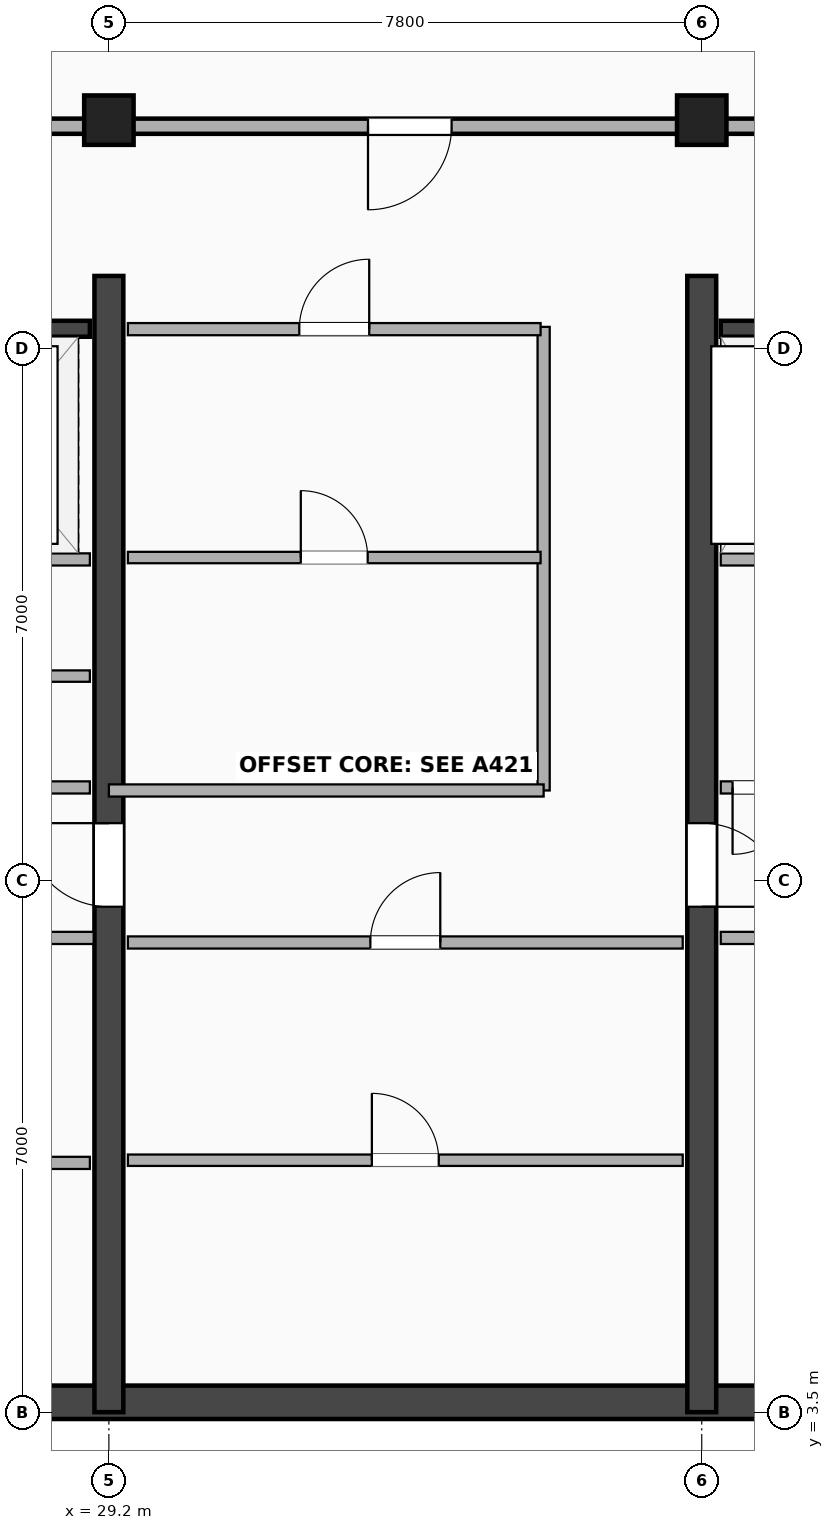
"""IFC4 building model, lengths in metres.
Left out: names, types, materials, properties, quantities, classifications, styles, units other than length and angle.
Written with IfcOpenShell. Run it as: python <this file> out.ifc"""

import sys

from ifc_helpers import new_model, si_unit, direction, frame, frame_2d, origin, origin_2d, place, context, subcontext, project, spatial, rectangle, extrude, element, fill, save


model = new_model("IFC4")
c1 = context("Model", 3, precision=1e-05, world=origin(), true_north=direction((0.0, 1.0)))
c2 = subcontext(c1, "Body", "Model", "MODEL_VIEW")
j1 = project(units=[si_unit("LENGTHUNIT", "METRE"), si_unit("PLANEANGLEUNIT", "RADIAN")], contexts=[c1])
p1 = place(None, origin())
s1 = spatial("IfcSite", under=j1, at=p1, CompositionType="ELEMENT")
p2 = place(p1, origin())
s2 = spatial("IfcBuilding", under=s1, at=p2, CompositionType="ELEMENT")
p3 = place(p2, frame((0.0, 0.0, 298.7)))
s3 = spatial("IfcBuildingStorey", under=s2, at=p3, CompositionType="ELEMENT", Elevation=298.7)
p4 = place(p3, frame((16.5, 3.63, 0.0), z_axis=(0.0, 0.0, 1.0), x_axis=(1.0, 0.0, 0.0)))
e1 = element("IfcWall", 1, at=p4, inside=s3, PredefinedType="SHEAR", context=c2, shape_type="SweptSolid", body=[
    extrude(rectangle(XDim=29.6, YDim=0.44, at=frame_2d((14.8, 0.0))), origin(), (0.0, 0.0, 1.0), 4.3),
])
p5 = place(p3, frame((29.2, 3.5, 0.0), z_axis=(0.0, 0.0, 1.0), x_axis=(0.0, 1.0, 0.0)))
e2 = element("IfcWall", 2, at=p5, inside=s3, PredefinedType="SHEAR", context=c2, shape_type="SweptSolid", body=[
    extrude(rectangle(XDim=14.95, YDim=0.38, at=frame_2d((7.475, 0.0))), origin(), (0.0, 0.0, 1.0), 4.3),
])
p6 = place(p5, frame((7.75, 0.0, 0.0), z_axis=(0.0, 0.0, 1.0), x_axis=(-1.0, 0.0, 0.0)))
e3 = element("IfcOpeningElement", 3, at=p6, cuts=e2, PredefinedType="OPENING", context=c2, shape_type="SweptSolid", body=[
    extrude(rectangle(XDim=1.1, YDim=2.15, at=frame_2d((0.55, 1.075))), frame((0.0, 0.2, 0.0), z_axis=(0.0, -1.0, 0.0), x_axis=(1.0, 0.0, 0.0)), (0.0, 0.0, 1.0), 0.4),
])
p7 = place(p3, frame((37.0, 3.5, 0.0), z_axis=(0.0, 0.0, 1.0), x_axis=(0.0, 1.0, 0.0)))
e4 = element("IfcWall", 4, at=p7, inside=s3, PredefinedType="SHEAR", context=c2, shape_type="SweptSolid", body=[
    extrude(rectangle(XDim=14.95, YDim=0.38, at=frame_2d((7.475, 0.0))), origin(), (0.0, 0.0, 1.0), 4.3),
])
p8 = place(p7, frame((6.65, 0.0, 0.0)))
e5 = element("IfcOpeningElement", 5, at=p8, cuts=e4, PredefinedType="OPENING", context=c2, shape_type="SweptSolid", body=[
    extrude(rectangle(XDim=1.1, YDim=2.15, at=frame_2d((0.55, 1.075))), frame((0.0, 0.2, 0.0), z_axis=(0.0, -1.0, 0.0), x_axis=(1.0, 0.0, 0.0)), (0.0, 0.0, 1.0), 0.4),
])
p9 = place(p3, frame((20.65, 17.755, 0.0), z_axis=(0.0, 0.0, 1.0), x_axis=(1.0, 0.0, 0.0)))
e6 = element("IfcWall", 6, at=p9, inside=s3, PredefinedType="SHEAR", context=c2, shape_type="SweptSolid", body=[
    extrude(rectangle(XDim=8.3, YDim=0.21, at=frame_2d((4.15, 0.0))), origin(), (0.0, 0.0, 1.0), 4.3),
])
p10 = place(p9, frame((2.2, 0.0, 0.0), z_axis=(0.0, 0.0, 1.0), x_axis=(-1.0, 0.0, 0.0)))
e7 = element("IfcOpeningElement", 7, at=p10, cuts=e6, PredefinedType="OPENING", context=c2, shape_type="SweptSolid", body=[
    extrude(rectangle(XDim=1.05, YDim=2.15, at=frame_2d((0.525, 1.075))), frame((0.0, 0.115, 0.0), z_axis=(0.0, -1.0, 0.0), x_axis=(1.0, 0.0, 0.0)), (0.0, 0.0, 1.0), 0.23),
])
p11 = place(p9, frame((4.15, 0.0, 0.0)))
e8 = element("IfcOpeningElement", 8, at=p11, cuts=e6, PredefinedType="OPENING", context=c2, shape_type="SweptSolid", body=[
    extrude(rectangle(XDim=1.1, YDim=2.18, at=frame_2d((0.55, 1.09))), frame((0.0, 0.115, 0.0), z_axis=(0.0, -1.0, 0.0), x_axis=(1.0, 0.0, 0.0)), (0.0, 0.0, 1.0), 0.23),
])
p12 = place(p3, frame((37.25, 17.755, 0.0), z_axis=(0.0, 0.0, 1.0), x_axis=(1.0, 0.0, 0.0)))
e9 = element("IfcWall", 9, at=p12, inside=s3, PredefinedType="SHEAR", context=c2, shape_type="SweptSolid", body=[
    extrude(rectangle(XDim=7.2, YDim=0.21, at=frame_2d((3.6, 0.0))), origin(), (0.0, 0.0, 1.0), 4.3),
])
p13 = place(p12, frame((2.05, 0.0, 0.0)))
e10 = element("IfcOpeningElement", 10, at=p13, cuts=e9, PredefinedType="OPENING", context=c2, shape_type="SweptSolid", body=[
    extrude(rectangle(XDim=1.1, YDim=2.18, at=frame_2d((0.55, 1.09))), frame((0.0, 0.115, 0.0), z_axis=(0.0, -1.0, 0.0), x_axis=(1.0, 0.0, 0.0)), (0.0, 0.0, 1.0), 0.23),
])
p14 = place(p12, frame((5.78, 0.0, 0.0), z_axis=(0.0, 0.0, 1.0), x_axis=(-1.0, 0.0, 0.0)))
e11 = element("IfcOpeningElement", 11, at=p14, cuts=e9, PredefinedType="OPENING", context=c2, shape_type="SweptSolid", body=[
    extrude(rectangle(XDim=1.05, YDim=2.15, at=frame_2d((0.525, 1.075))), frame((0.0, 0.115, 0.0), z_axis=(0.0, -1.0, 0.0), x_axis=(1.0, 0.0, 0.0)), (0.0, 0.0, 1.0), 0.23),
])
for number, where, z_axis, x_axis in (
    (12, (29.2, 20.5, -0.3), (0.0, 0.0, 1.0), (1.0, 0.0, 0.0)),
    (13, (37.0, 20.5, -0.3), (0.0, 0.0, 1.0), (1.0, 0.0, 0.0)),
):
    element("IfcColumn", number, at=place(p3, frame(where, z_axis=z_axis, x_axis=x_axis)), inside=s3, PredefinedType="COLUMN", context=c2, shape_type="SweptSolid", body=[
        extrude(rectangle(XDim=0.65, YDim=0.65, at=origin_2d()), origin(), (0.0, 0.0, 1.0), 4.6),
    ])
p15 = place(p3, frame((24.22, 14.72, 0.0), z_axis=(0.0, 0.0, 1.0), x_axis=(1.0, 0.0, 0.0)))
e14 = element("IfcWall", 14, at=p15, inside=s3, PredefinedType="PARTITIONING", context=c2, shape_type="SweptSolid", body=[
    extrude(rectangle(XDim=4.73, YDim=0.16, at=frame_2d((2.365, 0.0))), origin(), (0.0, 0.0, 1.0), 4.3),
])
p16 = place(p3, frame((37.25, 14.72, 0.0), z_axis=(0.0, 0.0, 1.0), x_axis=(1.0, 0.0, 0.0)))
e15 = element("IfcWall", 15, at=p16, inside=s3, PredefinedType="PARTITIONING", context=c2, shape_type="SweptSolid", body=[
    extrude(rectangle(XDim=3.61, YDim=0.16, at=frame_2d((1.805, 0.0))), origin(), (0.0, 0.0, 1.0), 4.3),
])
p17 = place(p3, frame((26.38, 20.42, 0.0), z_axis=(0.0, 0.0, 1.0), x_axis=(1.0, 0.0, 0.0)))
e16 = element("IfcWall", 16, at=p17, inside=s3, PredefinedType="PARTITIONING", context=c2, shape_type="SweptSolid", body=[
    extrude(rectangle(XDim=2.82, YDim=0.2, at=frame_2d((1.41, 0.0))), origin(), (0.0, 0.0, 1.0), 2.605),
])
p18 = place(p3, frame((29.2, 20.42, 0.0), z_axis=(0.0, 0.0, 1.0), x_axis=(1.0, 0.0, 0.0)))
e17 = element("IfcWall", 17, at=p18, inside=s3, PredefinedType="PARTITIONING", context=c2, shape_type="SweptSolid", body=[
    extrude(rectangle(XDim=7.8, YDim=0.2, at=frame_2d((3.9, 0.0))), origin(), (0.0, 0.0, 1.0), 2.605),
])
p19 = place(p18, frame((3.409, 0.0, 0.0)))
e18 = element("IfcOpeningElement", 18, at=p19, cuts=e17, PredefinedType="OPENING", context=c2, shape_type="SweptSolid", body=[
    extrude(rectangle(XDim=1.1, YDim=2.15, at=frame_2d((0.55, 1.075))), frame((0.0, 0.11, 0.0), z_axis=(0.0, -1.0, 0.0), x_axis=(1.0, 0.0, 0.0)), (0.0, 0.0, 1.0), 0.22),
])
p20 = place(p3, frame((37.0, 20.42, 0.0), z_axis=(0.0, 0.0, 1.0), x_axis=(1.0, 0.0, 0.0)))
e19 = element("IfcWall", 19, at=p20, inside=s3, PredefinedType="PARTITIONING", context=c2, shape_type="SweptSolid", body=[
    extrude(rectangle(XDim=7.45, YDim=0.2, at=frame_2d((3.725, 0.0))), origin(), (0.0, 0.0, 1.0), 2.605),
])
p21 = place(p20, frame((4.2, 0.0, 0.0)))
e20 = element("IfcOpeningElement", 20, at=p21, cuts=e19, PredefinedType="OPENING", context=c2, shape_type="SweptSolid", body=[
    extrude(rectangle(XDim=1.1, YDim=2.15, at=frame_2d((0.55, 1.075))), frame((0.0, 0.11, 0.0), z_axis=(0.0, -1.0, 0.0), x_axis=(1.0, 0.0, 0.0)), (0.0, 0.0, 1.0), 0.22),
])
p22 = place(p3, frame((24.22, 11.72, 0.0), z_axis=(0.0, 0.0, 1.0), x_axis=(1.0, 0.0, 0.0)))
e21 = element("IfcWall", 21, at=p22, inside=s3, PredefinedType="PARTITIONING", context=c2, shape_type="SweptSolid", body=[
    extrude(rectangle(XDim=4.73, YDim=0.16, at=frame_2d((2.365, 0.0))), origin(), (0.0, 0.0, 1.0), 4.3),
])
p23 = place(p22, frame((1.905, 0.0, 0.0)))
e22 = element("IfcOpeningElement", 22, at=p23, cuts=e21, PredefinedType="OPENING", context=c2, shape_type="SweptSolid", body=[
    extrude(rectangle(XDim=0.92, YDim=2.08, at=frame_2d((0.46, 1.04))), frame((0.0, 0.09, 0.0), z_axis=(0.0, -1.0, 0.0), x_axis=(1.0, 0.0, 0.0)), (0.0, 0.0, 1.0), 0.18),
])
p24 = place(p3, frame((24.22, 13.185, 0.0), z_axis=(0.0, 0.0, 1.0), x_axis=(1.0, 0.0, 0.0)))
e23 = element("IfcWall", 23, at=p24, inside=s3, PredefinedType="PARTITIONING", context=c2, shape_type="SweptSolid", body=[
    extrude(rectangle(XDim=4.73, YDim=0.15, at=frame_2d((2.365, 0.0))), origin(), (0.0, 0.0, 1.0), 4.3),
])
p25 = place(p24, frame((1.925, 0.0, 0.0)))
e24 = element("IfcOpeningElement", 24, at=p25, cuts=e23, PredefinedType="OPENING", context=c2, shape_type="SweptSolid", body=[
    extrude(rectangle(XDim=0.88, YDim=2.08, at=frame_2d((0.44, 1.04))), frame((0.0, 0.085, 0.0), z_axis=(0.0, -1.0, 0.0), x_axis=(1.0, 0.0, 0.0)), (0.0, 0.0, 1.0), 0.17),
])
p26 = place(p3, frame((37.25, 11.72, 0.0), z_axis=(0.0, 0.0, 1.0), x_axis=(1.0, 0.0, 0.0)))
e25 = element("IfcWall", 25, at=p26, inside=s3, PredefinedType="PARTITIONING", context=c2, shape_type="SweptSolid", body=[
    extrude(rectangle(XDim=1.191, YDim=0.16, at=frame_2d((0.596, 0.0))), origin(), (0.0, 0.0, 1.0), 4.3),
])
p27 = place(p26, frame((0.156, 0.0, 0.0)))
e26 = element("IfcOpeningElement", 26, at=p27, cuts=e25, PredefinedType="OPENING", context=c2, shape_type="SweptSolid", body=[
    extrude(rectangle(XDim=0.88, YDim=2.08, at=frame_2d((0.44, 1.04))), frame((0.0, 0.09, 0.0), z_axis=(0.0, -1.0, 0.0), x_axis=(1.0, 0.0, 0.0)), (0.0, 0.0, 1.0), 0.18),
])
p28 = place(p3, frame((20.65, 6.78, 0.0), z_axis=(0.0, 0.0, 1.0), x_axis=(1.0, 0.0, 0.0)))
e27 = element("IfcWall", 27, at=p28, inside=s3, PredefinedType="PARTITIONING", context=c2, shape_type="SweptSolid", body=[
    extrude(rectangle(XDim=8.3, YDim=0.16, at=frame_2d((4.15, 0.0))), origin(), (0.0, 0.0, 1.0), 4.3),
])
p29 = place(p3, frame((24.2, 9.74, 0.0), z_axis=(0.0, 0.0, 1.0), x_axis=(1.0, 0.0, 0.0)))
e28 = element("IfcWall", 28, at=p29, inside=s3, PredefinedType="PARTITIONING", context=c2, shape_type="SweptSolid", body=[
    extrude(rectangle(XDim=4.8, YDim=0.16, at=frame_2d((2.4, 0.0))), origin(), (0.0, 0.0, 1.0), 4.3),
])
p30 = place(p29, frame((1.85, 0.0, 0.0)))
e29 = element("IfcOpeningElement", 29, at=p30, cuts=e28, PredefinedType="OPENING", context=c2, shape_type="SweptSolid", body=[
    extrude(rectangle(XDim=1.1, YDim=2.15, at=frame_2d((0.55, 1.075))), frame((0.0, 0.09, 0.0), z_axis=(0.0, -1.0, 0.0), x_axis=(1.0, 0.0, 0.0)), (0.0, 0.0, 1.0), 0.18),
])
p31 = place(p3, frame((37.25, 9.74, 0.0), z_axis=(0.0, 0.0, 1.0), x_axis=(1.0, 0.0, 0.0)))
e30 = element("IfcWall", 30, at=p31, inside=s3, PredefinedType="PARTITIONING", context=c2, shape_type="SweptSolid", body=[
    extrude(rectangle(XDim=3.73, YDim=0.16, at=frame_2d((1.865, 0.0))), origin(), (0.0, 0.0, 1.0), 4.3),
])
p32 = place(p31, frame((2.25, 0.0, 0.0), z_axis=(0.0, 0.0, 1.0), x_axis=(-1.0, 0.0, 0.0)))
e31 = element("IfcOpeningElement", 31, at=p32, cuts=e30, PredefinedType="OPENING", context=c2, shape_type="SweptSolid", body=[
    extrude(rectangle(XDim=0.95, YDim=2.15, at=frame_2d((0.475, 1.075))), frame((0.0, 0.09, 0.0), z_axis=(0.0, -1.0, 0.0), x_axis=(1.0, 0.0, 0.0)), (0.0, 0.0, 1.0), 0.18),
])
p33 = place(p3, frame((34.92, 11.68, 0.0), z_axis=(0.0, 0.0, 1.0), x_axis=(0.0, 1.0, 0.0)))
e32 = element("IfcWall", 32, at=p33, inside=s3, PredefinedType="PARTITIONING", context=c2, shape_type="SweptSolid", body=[
    extrude(rectangle(XDim=6.1, YDim=0.16, at=frame_2d((3.05, 0.0))), origin(), (0.0, 0.0, 1.0), 4.3),
])
p34 = place(p3, frame((29.45, 9.68, 0.0), z_axis=(0.0, 0.0, 1.0), x_axis=(1.0, 0.0, 0.0)))
e33 = element("IfcWall", 33, at=p34, inside=s3, PredefinedType="PARTITIONING", context=c2, shape_type="SweptSolid", body=[
    extrude(rectangle(XDim=7.3, YDim=0.16, at=frame_2d((3.65, 0.0))), origin(), (0.0, 0.0, 1.0), 4.3),
])
p35 = place(p34, frame((4.11, 0.0, 0.0), z_axis=(0.0, 0.0, 1.0), x_axis=(-1.0, 0.0, 0.0)))
e34 = element("IfcOpeningElement", 34, at=p35, cuts=e33, PredefinedType="OPENING", context=c2, shape_type="SweptSolid", body=[
    extrude(rectangle(XDim=0.92, YDim=2.08, at=frame_2d((0.46, 1.04))), frame((0.0, 0.09, 0.0), z_axis=(0.0, -1.0, 0.0), x_axis=(1.0, 0.0, 0.0)), (0.0, 0.0, 1.0), 0.18),
])
p36 = place(p3, frame((29.45, 6.815, 0.0), z_axis=(0.0, 0.0, 1.0), x_axis=(1.0, 0.0, 0.0)))
e35 = element("IfcWall", 35, at=p36, inside=s3, PredefinedType="PARTITIONING", context=c2, shape_type="SweptSolid", body=[
    extrude(rectangle(XDim=7.3, YDim=0.15, at=frame_2d((3.65, 0.0))), origin(), (0.0, 0.0, 1.0), 4.3),
])
p37 = place(p36, frame((4.09, 0.0, 0.0), z_axis=(0.0, 0.0, 1.0), x_axis=(-1.0, 0.0, 0.0)))
e36 = element("IfcOpeningElement", 36, at=p37, cuts=e35, PredefinedType="OPENING", context=c2, shape_type="SweptSolid", body=[
    extrude(rectangle(XDim=0.88, YDim=2.08, at=frame_2d((0.44, 1.04))), frame((0.0, 0.085, 0.0), z_axis=(0.0, -1.0, 0.0), x_axis=(1.0, 0.0, 0.0)), (0.0, 0.0, 1.0), 0.17),
])
p38 = place(p3, frame((29.2, 11.68, 0.0), z_axis=(0.0, 0.0, 1.0), x_axis=(1.0, 0.0, 0.0)))
e37 = element("IfcWall", 37, at=p38, inside=s3, PredefinedType="PARTITIONING", context=c2, shape_type="SweptSolid", body=[
    extrude(rectangle(XDim=5.72, YDim=0.16, at=frame_2d((2.86, 0.0))), origin(), (0.0, 0.0, 1.0), 4.3),
])
p39 = place(p3, frame((29.45, 17.75, 0.0), z_axis=(0.0, 0.0, 1.0), x_axis=(1.0, 0.0, 0.0)))
e38 = element("IfcWall", 38, at=p39, inside=s3, PredefinedType="PARTITIONING", context=c2, shape_type="SweptSolid", body=[
    extrude(rectangle(XDim=5.43, YDim=0.16, at=frame_2d((2.715, 0.0))), origin(), (0.0, 0.0, 1.0), 4.3),
])
p40 = place(p39, frame((3.175, 0.0, 0.0), z_axis=(0.0, 0.0, 1.0), x_axis=(-1.0, 0.0, 0.0)))
e39 = element("IfcOpeningElement", 39, at=p40, cuts=e38, PredefinedType="OPENING", context=c2, shape_type="SweptSolid", body=[
    extrude(rectangle(XDim=0.92, YDim=2.08, at=frame_2d((0.46, 1.04))), frame((0.0, 0.09, 0.0), z_axis=(0.0, -1.0, 0.0), x_axis=(1.0, 0.0, 0.0)), (0.0, 0.0, 1.0), 0.18),
])
p41 = place(p3, frame((29.45, 14.745, 0.0), z_axis=(0.0, 0.0, 1.0), x_axis=(1.0, 0.0, 0.0)))
e40 = element("IfcWall", 40, at=p41, inside=s3, PredefinedType="PARTITIONING", context=c2, shape_type="SweptSolid", body=[
    extrude(rectangle(XDim=5.43, YDim=0.15, at=frame_2d((2.715, 0.0))), origin(), (0.0, 0.0, 1.0), 4.3),
])
p42 = place(p41, frame((3.155, 0.0, 0.0), z_axis=(0.0, 0.0, 1.0), x_axis=(-1.0, 0.0, 0.0)))
e41 = element("IfcOpeningElement", 41, at=p42, cuts=e40, PredefinedType="OPENING", context=c2, shape_type="SweptSolid", body=[
    extrude(rectangle(XDim=0.88, YDim=2.08, at=frame_2d((0.44, 1.04))), frame((0.0, 0.085, 0.0), z_axis=(0.0, -1.0, 0.0), x_axis=(1.0, 0.0, 0.0)), (0.0, 0.0, 1.0), 0.17),
])
p43 = place(p6, origin())
e42 = element("IfcDoor", 42, at=p43, inside=s3, OperationType="SINGLE_SWING_RIGHT", PredefinedType="DOOR", context=c2, shape_type="SweptSolid", body=[
    extrude(rectangle(XDim=1.1, YDim=2.15, at=frame_2d((0.55, 1.075))), frame((0.0, 0.025, 0.0), z_axis=(0.0, -1.0, 0.0), x_axis=(1.0, 0.0, 0.0)), (0.0, 0.0, 1.0), 0.05),
])
fill(e3, e42)
p44 = place(p8, origin())
e43 = element("IfcDoor", 43, at=p44, inside=s3, OperationType="SINGLE_SWING_LEFT", PredefinedType="DOOR", context=c2, shape_type="SweptSolid", body=[
    extrude(rectangle(XDim=1.1, YDim=2.15, at=frame_2d((0.55, 1.075))), frame((0.0, 0.025, 0.0), z_axis=(0.0, -1.0, 0.0), x_axis=(1.0, 0.0, 0.0)), (0.0, 0.0, 1.0), 0.05),
])
fill(e5, e43)
p45 = place(p19, origin())
e44 = element("IfcDoor", 44, at=p45, inside=s3, OperationType="SINGLE_SWING_LEFT", PredefinedType="DOOR", context=c2, shape_type="SweptSolid", body=[
    extrude(rectangle(XDim=1.1, YDim=2.15, at=frame_2d((0.55, 1.075))), frame((0.0, 0.025, 0.0), z_axis=(0.0, -1.0, 0.0), x_axis=(1.0, 0.0, 0.0)), (0.0, 0.0, 1.0), 0.05),
])
fill(e18, e44)
p46 = place(p27, origin())
e45 = element("IfcDoor", 45, at=p46, inside=s3, OperationType="SINGLE_SWING_LEFT", PredefinedType="DOOR", context=c2, shape_type="SweptSolid", body=[
    extrude(rectangle(XDim=0.88, YDim=2.08, at=frame_2d((0.44, 1.04))), frame((0.0, 0.025, 0.0), z_axis=(0.0, -1.0, 0.0), x_axis=(1.0, 0.0, 0.0)), (0.0, 0.0, 1.0), 0.05),
])
fill(e26, e45)
p47 = place(p35, origin())
e46 = element("IfcDoor", 46, at=p47, inside=s3, OperationType="SINGLE_SWING_RIGHT", PredefinedType="DOOR", context=c2, shape_type="SweptSolid", body=[
    extrude(rectangle(XDim=0.92, YDim=2.08, at=frame_2d((0.46, 1.04))), frame((0.0, 0.025, 0.0), z_axis=(0.0, -1.0, 0.0), x_axis=(1.0, 0.0, 0.0)), (0.0, 0.0, 1.0), 0.05),
])
fill(e34, e46)
p48 = place(p37, origin())
e47 = element("IfcDoor", 47, at=p48, inside=s3, OperationType="SINGLE_SWING_LEFT", PredefinedType="DOOR", context=c2, shape_type="SweptSolid", body=[
    extrude(rectangle(XDim=0.88, YDim=2.08, at=frame_2d((0.44, 1.04))), frame((0.0, 0.025, 0.0), z_axis=(0.0, -1.0, 0.0), x_axis=(1.0, 0.0, 0.0)), (0.0, 0.0, 1.0), 0.05),
])
fill(e36, e47)
p49 = place(p40, origin())
e48 = element("IfcDoor", 48, at=p49, inside=s3, OperationType="SINGLE_SWING_RIGHT", PredefinedType="DOOR", context=c2, shape_type="SweptSolid", body=[
    extrude(rectangle(XDim=0.92, YDim=2.08, at=frame_2d((0.46, 1.04))), frame((0.0, 0.025, 0.0), z_axis=(0.0, -1.0, 0.0), x_axis=(1.0, 0.0, 0.0)), (0.0, 0.0, 1.0), 0.05),
])
fill(e39, e48)
p50 = place(p42, origin())
e49 = element("IfcDoor", 49, at=p50, inside=s3, OperationType="SINGLE_SWING_LEFT", PredefinedType="DOOR", context=c2, shape_type="SweptSolid", body=[
    extrude(rectangle(XDim=0.88, YDim=2.08, at=frame_2d((0.44, 1.04))), frame((0.0, 0.025, 0.0), z_axis=(0.0, -1.0, 0.0), x_axis=(1.0, 0.0, 0.0)), (0.0, 0.0, 1.0), 0.05),
])
fill(e41, e49)
save(model, sys.argv[1])
